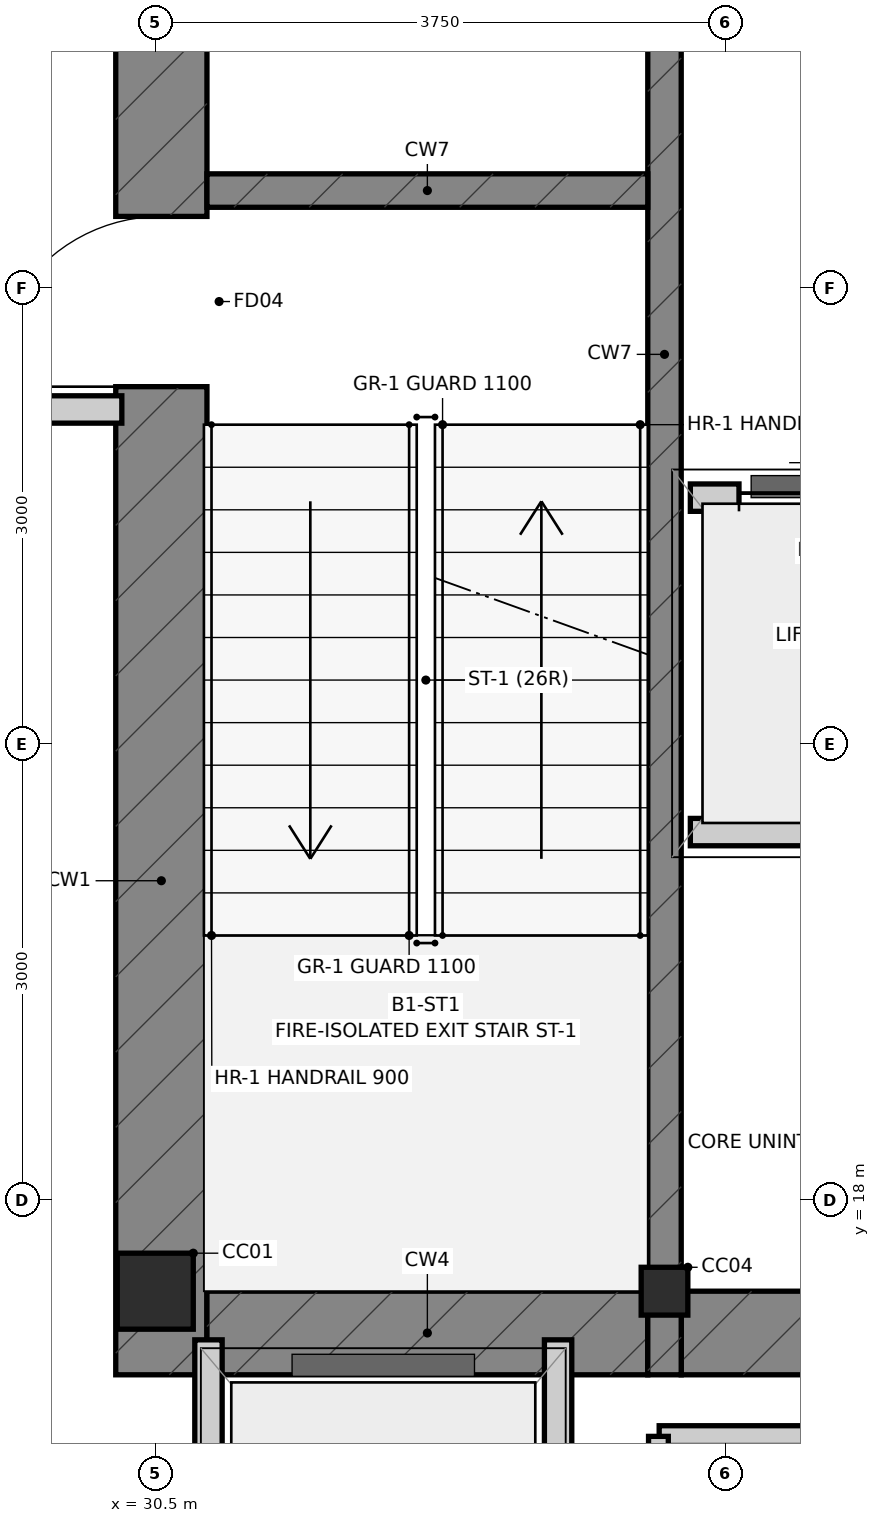
"""IFC4 building model, lengths in metres.
Left out: names, types, materials, properties, quantities, classifications, styles, units other than length and angle.
Written with IfcOpenShell. Run it as: python <this file> out.ifc"""

import sys

from ifc_helpers import new_model, si_unit, direction, frame, frame_2d, origin, origin_2d, place, context, subcontext, project, spatial, rectangle, i_section, extrude, source, transform, mapped, element, fill, save


model = new_model("IFC4")
c1 = context("Model", 3, precision=1e-05, world=origin(), true_north=direction((0.0, 1.0)))
c2 = subcontext(c1, "Body", "Model", "MODEL_VIEW")
j1 = project(units=[si_unit("LENGTHUNIT", "METRE"), si_unit("PLANEANGLEUNIT", "RADIAN")], contexts=[c1])
p1 = place(None, origin())
s1 = spatial("IfcSite", under=j1, at=p1, CompositionType="ELEMENT")
p2 = place(p1, origin())
s2 = spatial("IfcBuilding", under=s1, at=p2, CompositionType="ELEMENT")
p3 = place(p2, frame((0.0, 0.0, -4.8)))
s3 = spatial("IfcBuildingStorey", under=s2, at=p3, CompositionType="ELEMENT", Elevation=-4.8)
m1 = source(origin(), c2, "Body", "SweptSolid", [
    extrude(i_section(OverallWidth=0.5, OverallDepth=0.5, WebThickness=0.028, FlangeThickness=0.04, at=origin_2d()), origin(), (0.0, 0.0, 1.0), 4.8),
])
p4 = place(p3, frame((30.5, 17.4, 0.0), z_axis=(0.0, 0.0, 1.0), x_axis=(1.0, 0.0, 0.0)))
e1 = element("IfcColumn", 1, at=p4, inside=s3, PredefinedType="COLUMN", context=c2, shape_type="MappedRepresentation", body=[
    mapped(m1, transform((0.0, 0.0, 0.0), scale=1.0)),
])
m2 = source(origin(), c2, "Body", "SweptSolid", [
    extrude(i_section(OverallWidth=0.307, OverallDepth=0.315, WebThickness=0.012, FlangeThickness=0.019, at=origin_2d()), origin(), (0.0, 0.0, 1.0), 4.8),
])
p5 = place(p3, frame((33.85, 17.4, 0.0), z_axis=(0.0, 0.0, 1.0), x_axis=(1.0, 0.0, 0.0)))
e2 = element("IfcColumn", 2, at=p5, inside=s3, PredefinedType="COLUMN", context=c2, shape_type="MappedRepresentation", body=[
    mapped(m2, transform((0.0, 0.0, 0.0), scale=1.0)),
])
p6 = place(p3, frame((30.54, 16.85, 0.0), z_axis=(0.0, 0.0, 1.0), x_axis=(0.0, 1.0, 0.0)))
e3 = element("IfcWall", 3, at=p6, inside=s3, PredefinedType="SHEAR", context=c2, shape_type="SweptSolid", body=[
    extrude(rectangle(XDim=13.425, YDim=0.6, at=frame_2d((6.712, 0.0))), origin(), (0.0, 0.0, 1.0), 4.8),
])
p7 = place(p6, frame((6.5, 0.0, 0.0)))
e4 = element("IfcOpeningElement", 4, at=p7, cuts=e3, PredefinedType="OPENING", context=c2, shape_type="SweptSolid", body=[
    extrude(rectangle(XDim=1.12, YDim=2.15, at=frame_2d((0.56, 1.075))), frame((0.0, 0.312, 0.0), z_axis=(0.0, -1.0, 0.0), x_axis=(1.0, 0.0, 0.0)), (0.0, 0.0, 1.0), 0.624),
])
p8 = place(p6, frame((10.95, 0.0, 0.0)))
e5 = element("IfcOpeningElement", 5, at=p8, cuts=e3, PredefinedType="OPENING", context=c2, shape_type="SweptSolid", body=[
    extrude(rectangle(XDim=1.2, YDim=2.2, at=frame_2d((0.6, 1.1))), frame((0.0, 0.312, 0.0), z_axis=(0.0, -1.0, 0.0), x_axis=(1.0, 0.0, 0.0)), (0.0, 0.0, 1.0), 0.624),
])
p9 = place(p3, frame((30.84, 17.125, 0.0), z_axis=(0.0, 0.0, 1.0), x_axis=(1.0, 0.0, 0.0)))
e6 = element("IfcWall", 6, at=p9, inside=s3, PredefinedType="SHEAR", context=c2, shape_type="SweptSolid", body=[
    extrude(rectangle(XDim=2.9, YDim=0.55, at=frame_2d((1.45, 0.0))), origin(), (0.0, 0.0, 1.0), 4.8),
])
p10 = place(p3, frame((33.96, 17.125, 0.0), z_axis=(0.0, 0.0, 1.0), x_axis=(1.0, 0.0, 0.0)))
e7 = element("IfcWall", 7, at=p10, inside=s3, PredefinedType="SHEAR", context=c2, shape_type="SweptSolid", body=[
    extrude(rectangle(XDim=8.08, YDim=0.55, at=frame_2d((4.04, 0.0))), origin(), (0.0, 0.0, 1.0), 4.8),
])
p11 = place(p3, frame((33.85, 16.85, 0.0), z_axis=(0.0, 0.0, 1.0), x_axis=(0.0, 1.0, 0.0)))
e8 = element("IfcWall", 8, at=p11, inside=s3, PredefinedType="SHEAR", context=c2, shape_type="SweptSolid", body=[
    extrude(rectangle(XDim=13.425, YDim=0.22, at=frame_2d((6.712, 0.0))), origin(), (0.0, 0.0, 1.0), 4.8),
])
p12 = place(p3, frame((30.84, 24.64, 0.0), z_axis=(0.0, 0.0, 1.0), x_axis=(1.0, 0.0, 0.0)))
e9 = element("IfcWall", 9, at=p12, inside=s3, PredefinedType="SHEAR", context=c2, shape_type="SweptSolid", body=[
    extrude(rectangle(XDim=2.9, YDim=0.22, at=frame_2d((1.45, 0.0))), origin(), (0.0, 0.0, 1.0), 4.8),
])
p13 = place(p3, frame((30.85, 14.42, 0.0), z_axis=(0.0, 0.0, 1.0), x_axis=(0.0, 1.0, 0.0)))
e10 = element("IfcWall", 10, at=p13, inside=s3, PredefinedType="PARTITIONING", context=c2, shape_type="SweptSolid", body=[
    extrude(rectangle(XDim=2.66, YDim=0.18, at=frame_2d((1.33, 0.0))), origin(), (0.0, 0.0, 1.0), 3.854),
])
p14 = place(p3, frame((33.15, 14.42, 0.0), z_axis=(0.0, 0.0, 1.0), x_axis=(0.0, 1.0, 0.0)))
e11 = element("IfcWall", 11, at=p14, inside=s3, PredefinedType="PARTITIONING", context=c2, shape_type="SweptSolid", body=[
    extrude(rectangle(XDim=2.66, YDim=0.18, at=frame_2d((1.33, 0.0))), origin(), (0.0, 0.0, 1.0), 4.48),
])
p15 = place(p3, frame((34.02, 22.62, 0.0), z_axis=(0.0, 0.0, 1.0), x_axis=(1.0, 0.0, 0.0)))
e12 = element("IfcWall", 12, at=p15, inside=s3, PredefinedType="PARTITIONING", context=c2, shape_type="SweptSolid", body=[
    extrude(rectangle(XDim=3.6, YDim=0.18, at=frame_2d((1.8, 0.0))), origin(), (0.0, 0.0, 1.0), 4.48),
])
p16 = place(p15, frame((0.32, 0.0, 0.0)))
e13 = element("IfcOpeningElement", 13, at=p16, cuts=e12, PredefinedType="OPENING", context=c2, shape_type="SweptSolid", body=[
    extrude(rectangle(XDim=1.1, YDim=2.2, at=frame_2d((0.55, 1.1))), frame((0.0, 0.102, 0.0), z_axis=(0.0, -1.0, 0.0), x_axis=(1.0, 0.0, 0.0)), (0.0, 0.0, 1.0), 0.204),
])
p17 = place(p15, frame((2.12, 0.0, 0.0)))
e14 = element("IfcOpeningElement", 14, at=p17, cuts=e12, PredefinedType="OPENING", context=c2, shape_type="SweptSolid", body=[
    extrude(rectangle(XDim=1.1, YDim=2.2, at=frame_2d((0.55, 1.1))), frame((0.0, 0.102, 0.0), z_axis=(0.0, -1.0, 0.0), x_axis=(1.0, 0.0, 0.0)), (0.0, 0.0, 1.0), 0.204),
])
p18 = place(p3, frame((27.52, 23.2, 0.0), z_axis=(0.0, 0.0, 1.0), x_axis=(1.0, 0.0, 0.0)))
e15 = element("IfcWall", 15, at=p18, inside=s3, PredefinedType="PARTITIONING", context=c2, shape_type="SweptSolid", body=[
    extrude(rectangle(XDim=2.76, YDim=0.18, at=frame_2d((1.38, 0.0))), origin(), (0.0, 0.0, 1.0), 4.48),
])
p19 = place(p3, frame((34.02, 20.42, 0.0), z_axis=(0.0, 0.0, 1.0), x_axis=(1.0, 0.0, 0.0)))
e16 = element("IfcWall", 16, at=p19, inside=s3, PredefinedType="PARTITIONING", context=c2, shape_type="SweptSolid", body=[
    extrude(rectangle(XDim=3.64, YDim=0.18, at=frame_2d((1.82, 0.0))), origin(), (0.0, 0.0, 1.0), 4.48),
])
p20 = place(p3, frame((48.58, 16.45, 0.0), z_axis=(0.0, 0.0, 1.0), x_axis=(-1.0, 0.0, 0.0)))
e17 = element("IfcWall", 17, at=p20, inside=s3, PredefinedType="PARTITIONING", context=c2, shape_type="SweptSolid", body=[
    extrude(rectangle(XDim=14.765, YDim=0.13, at=frame_2d((7.383, 0.0))), origin(), (0.0, 0.0, 1.0), 4.48),
])
p21 = place(p3, frame((33.81, 16.445, 0.0), z_axis=(0.0, 0.0, 1.0), x_axis=(0.0, -1.0, 0.0)))
e18 = element("IfcWall", 18, at=p21, inside=s3, PredefinedType="PARTITIONING", context=c2, shape_type="SweptSolid", body=[
    extrude(rectangle(XDim=2.19, YDim=0.13, at=frame_2d((1.095, 0.0))), origin(), (0.0, 0.0, 1.0), 4.48),
])
p22 = place(p7, origin())
e19 = element("IfcDoor", 19, at=p22, inside=s3, OperationType="SINGLE_SWING_LEFT", PredefinedType="DOOR", context=c2, shape_type="SweptSolid", body=[
    extrude(rectangle(XDim=1.12, YDim=2.15, at=frame_2d((0.56, 1.075))), frame((0.0, 0.025, 0.0), z_axis=(0.0, -1.0, 0.0), x_axis=(1.0, 0.0, 0.0)), (0.0, 0.0, 1.0), 0.05),
])
fill(e4, e19)
p23 = place(p16, origin())
e20 = element("IfcDoor", 20, at=p23, inside=s3, OperationType="SLIDING_TO_LEFT", PredefinedType="DOOR", context=c2, shape_type="SweptSolid", body=[
    extrude(rectangle(XDim=1.1, YDim=2.2, at=frame_2d((0.55, 1.1))), frame((0.0, 0.025, 0.0), z_axis=(0.0, -1.0, 0.0), x_axis=(1.0, 0.0, 0.0)), (0.0, 0.0, 1.0), 0.05),
])
fill(e13, e20)
save(model, sys.argv[1])
